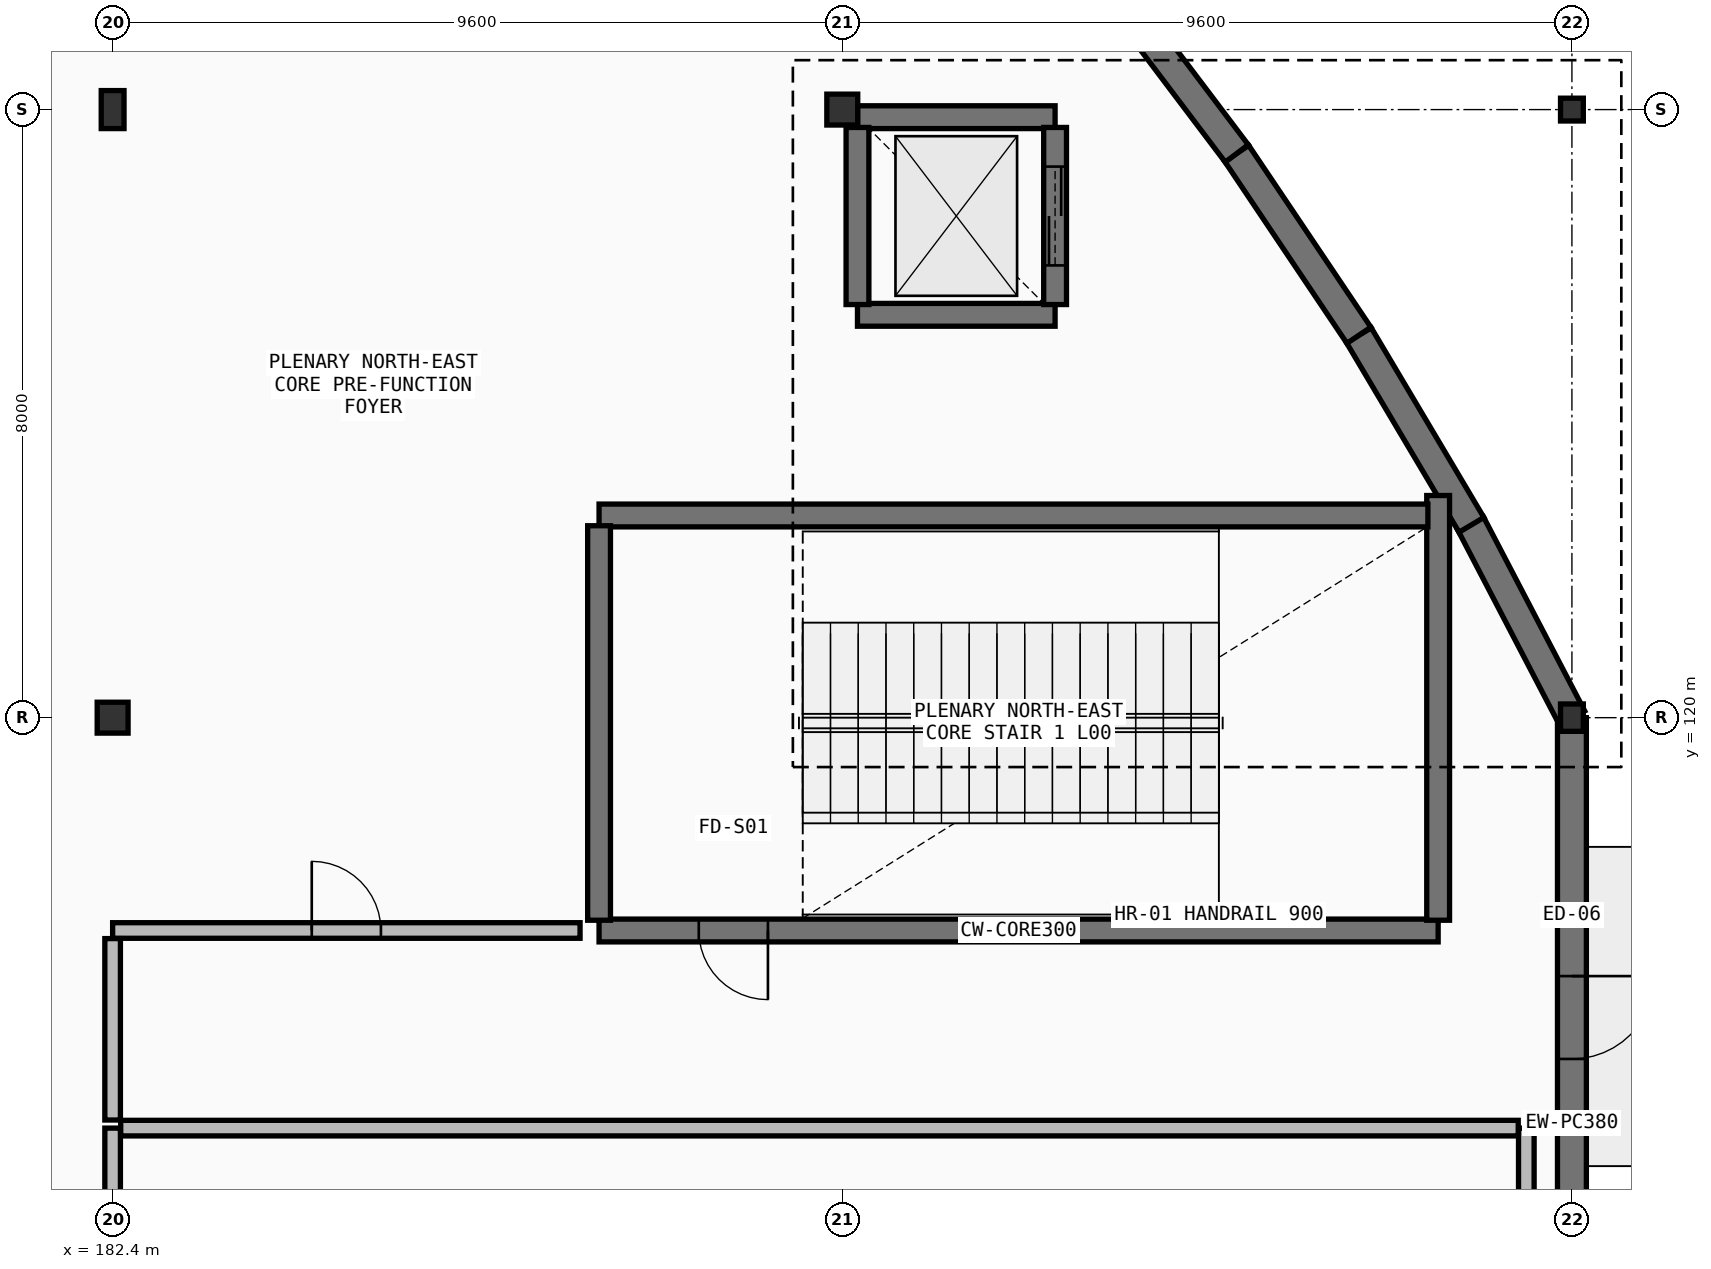
"""IFC4 building model, lengths in metres.
Left out: names, types, materials, properties, quantities, classifications, styles, units other than length and angle.
Written with IfcOpenShell. Run it as: python <this file> out.ifc"""

import sys

from ifc_helpers import new_model, si_unit, direction, frame, frame_2d, origin, origin_2d, place, context, subcontext, project, spatial, rectangle, hollow_circle, i_section, extrude, element, fill, save


model = new_model("IFC4")
c1 = context("Model", 3, precision=1e-05, world=origin(), true_north=direction((0.0, 1.0)))
c2 = subcontext(c1, "Body", "Model", "MODEL_VIEW")
j1 = project(units=[si_unit("LENGTHUNIT", "METRE"), si_unit("PLANEANGLEUNIT", "RADIAN")], contexts=[c1])
p1 = place(None, origin())
s1 = spatial("IfcSite", under=j1, at=p1, CompositionType="ELEMENT")
p2 = place(p1, origin())
s2 = spatial("IfcBuilding", under=s1, at=p2, CompositionType="ELEMENT")
p3 = place(p2, origin())
s3 = spatial("IfcBuildingStorey", under=s2, at=p3, CompositionType="ELEMENT", Elevation=0.0)
p4 = place(p3, frame((182.4, 120.0, 0.0), z_axis=(0.0, 0.0, 1.0), x_axis=(1.0, 0.0, 0.0)))
e1 = element("IfcColumn", 1, at=p4, inside=s3, PredefinedType="COLUMN", context=c2, shape_type="SweptSolid", body=[
    extrude(hollow_circle(Radius=0.203, WallThickness=0.02, at=origin_2d()), origin(), (0.0, 0.0, 1.0), 6.0),
])
p5 = place(p3, frame((182.4, 128.0, 0.0), z_axis=(0.0, 0.0, 1.0), x_axis=(1.0, 0.0, 0.0)))
e2 = element("IfcColumn", 2, at=p5, inside=s3, PredefinedType="COLUMN", context=c2, shape_type="SweptSolid", body=[
    extrude(i_section(OverallWidth=0.3, OverallDepth=0.5, WebThickness=0.014, FlangeThickness=0.028, FilletRadius=0.027, at=origin_2d()), origin(), (0.0, 0.0, 1.0), 6.0),
])
p6 = place(p3, frame((192.0, 128.0, 0.0), z_axis=(0.0, 0.0, 1.0), x_axis=(1.0, 0.0, 0.0)))
e3 = element("IfcColumn", 3, at=p6, inside=s3, PredefinedType="COLUMN", context=c2, shape_type="SweptSolid", body=[
    extrude(hollow_circle(Radius=0.203, WallThickness=0.02, at=origin_2d()), origin(), (0.0, 0.0, 1.0), 6.0),
])
p7 = place(p3, frame((201.6, 120.0, 0.0), z_axis=(0.0, 0.0, 1.0), x_axis=(1.0, 0.0, 0.0)))
e4 = element("IfcColumn", 4, at=p7, inside=s3, PredefinedType="COLUMN", context=c2, shape_type="SweptSolid", body=[
    extrude(i_section(OverallWidth=0.3, OverallDepth=0.36, WebThickness=0.012, FlangeThickness=0.022, FilletRadius=0.027, at=origin_2d()), origin(), (0.0, 0.0, 1.0), 6.0),
])
p8 = place(p3, frame((201.6, 128.0, 0.0), z_axis=(0.0, 0.0, 1.0), x_axis=(1.0, 0.0, 0.0)))
e5 = element("IfcColumn", 5, at=p8, inside=s3, PredefinedType="COLUMN", context=c2, shape_type="SweptSolid", body=[
    extrude(i_section(OverallWidth=0.3, OverallDepth=0.3, WebThickness=0.011, FlangeThickness=0.019, FilletRadius=0.027, at=origin_2d()), origin(), (0.0, 0.0, 1.0), 6.0),
])
p9 = place(p3, frame((201.6, 120.0, 0.0), z_axis=(0.0, 0.0, 1.0), x_axis=(0.0, -1.0, 0.0)))
e6 = element("IfcWall", 6, at=p9, inside=s3, PredefinedType="SOLIDWALL", context=c2, shape_type="SweptSolid", body=[
    extrude(rectangle(XDim=10.667, YDim=0.38, at=frame_2d((5.333, 0.0))), origin(), (0.0, 0.0, 1.0), 5.5),
])
p10 = place(p9, frame((3.4, 0.0, 0.0)))
e7 = element("IfcOpeningElement", 7, at=p10, cuts=e6, PredefinedType="OPENING", context=c2, shape_type="SweptSolid", body=[
    extrude(rectangle(XDim=1.09, YDim=2.22, at=frame_2d((0.545, 1.11))), frame((0.0, 0.2, 0.0), z_axis=(0.0, -1.0, 0.0), x_axis=(1.0, 0.0, 0.0)), (0.0, 0.0, 1.0), 0.4),
])
p11 = place(p3, frame((201.6, 120.0, 0.0), z_axis=(0.0, 0.0, 1.0), x_axis=(-0.462438550367, 0.886651333465, 0.0)))
e8 = element("IfcWall", 8, at=p11, inside=s3, PredefinedType="SOLIDWALL", context=c2, shape_type="SweptSolid", body=[
    extrude(rectangle(XDim=2.88, YDim=0.38, at=frame_2d((1.44, 0.0))), origin(), (0.0, 0.0, 1.0), 5.5),
])
p12 = place(p3, frame((200.278, 122.537, 0.0), z_axis=(0.0, 0.0, 1.0), x_axis=(-0.510616534419, 0.859808557051, 0.0)))
e9 = element("IfcWall", 9, at=p12, inside=s3, PredefinedType="SOLIDWALL", context=c2, shape_type="SweptSolid", body=[
    extrude(rectangle(XDim=2.901, YDim=0.38, at=frame_2d((1.45, 0.0))), origin(), (0.0, 0.0, 1.0), 5.5),
])
p13 = place(p3, frame((198.797, 125.031, 0.0), z_axis=(0.0, 0.0, 1.0), x_axis=(-0.55768775085, 0.830050825282, 0.0)))
e10 = element("IfcWall", 10, at=p13, inside=s3, PredefinedType="SOLIDWALL", context=c2, shape_type="SweptSolid", body=[
    extrude(rectangle(XDim=2.882, YDim=0.38, at=frame_2d((1.441, 0.0))), origin(), (0.0, 0.0, 1.0), 5.5),
])
p14 = place(p3, frame((197.19, 127.423, 0.0), z_axis=(0.0, 0.0, 1.0), x_axis=(-0.602763527755, 0.797919876685, 0.0)))
e11 = element("IfcWall", 11, at=p14, inside=s3, PredefinedType="SOLIDWALL", context=c2, shape_type="SweptSolid", body=[
    extrude(rectangle(XDim=2.88, YDim=0.38, at=frame_2d((1.44, 0.0))), origin(), (0.0, 0.0, 1.0), 5.5),
])
p15 = place(p3, frame((199.84, 117.2, 0.0), z_axis=(0.0, 0.0, 1.0), x_axis=(-1.0, 0.0, 0.0)))
e12 = element("IfcWall", 12, at=p15, inside=s3, PredefinedType="SHEAR", context=c2, shape_type="SweptSolid", body=[
    extrude(rectangle(XDim=11.04, YDim=0.3, at=frame_2d((5.52, 0.0))), origin(), (0.0, 0.0, 1.0), 5.64),
])
p16 = place(p15, frame((8.818, 0.0, 0.0)))
e13 = element("IfcOpeningElement", 13, at=p16, cuts=e12, PredefinedType="OPENING", context=c2, shape_type="SweptSolid", body=[
    extrude(rectangle(XDim=0.91, YDim=2.08, at=frame_2d((0.455, 1.04))), frame((0.0, 0.16, 0.0), z_axis=(0.0, -1.0, 0.0), x_axis=(1.0, 0.0, 0.0)), (0.0, 0.0, 1.0), 0.32),
])
p17 = place(p3, frame((199.84, 122.923, 0.0), z_axis=(0.0, 0.0, 1.0), x_axis=(0.0, -1.0, 0.0)))
e14 = element("IfcWall", 14, at=p17, inside=s3, PredefinedType="SHEAR", context=c2, shape_type="SweptSolid", body=[
    extrude(rectangle(XDim=5.588, YDim=0.3, at=frame_2d((2.794, 0.0))), origin(), (0.0, 0.0, 1.0), 5.64),
])
p18 = place(p3, frame((188.8, 122.66, 0.0), z_axis=(0.0, 0.0, 1.0), x_axis=(1.0, 0.0, 0.0)))
e15 = element("IfcWall", 15, at=p18, inside=s3, PredefinedType="SHEAR", context=c2, shape_type="SweptSolid", body=[
    extrude(rectangle(XDim=10.905, YDim=0.3, at=frame_2d((5.453, 0.0))), origin(), (0.0, 0.0, 1.0), 5.64),
])
p19 = place(p3, frame((188.8, 117.335, 0.0), z_axis=(0.0, 0.0, 1.0), x_axis=(0.0, 1.0, 0.0)))
e16 = element("IfcWall", 16, at=p19, inside=s3, PredefinedType="SHEAR", context=c2, shape_type="SweptSolid", body=[
    extrude(rectangle(XDim=5.19, YDim=0.3, at=frame_2d((2.595, 0.0))), origin(), (0.0, 0.0, 1.0), 5.64),
])
for number, where, z_axis, x_axis in (
    (17, (194.8, 127.9, 0.0), (0.0, 0.0, 1.0), (-1.0, 0.0, 0.0)),
    (18, (192.2, 125.3, 0.0), (0.0, 0.0, 1.0), (1.0, 0.0, 0.0)),
):
    element("IfcWall", number, at=place(p3, frame(where, z_axis=z_axis, x_axis=x_axis)), inside=s3, PredefinedType="SHEAR", context=c2, shape_type="SweptSolid", body=[
        extrude(rectangle(XDim=2.6, YDim=0.3, at=frame_2d((1.3, 0.0))), origin(), (0.0, 0.0, 1.0), 5.64),
    ])
p20 = place(p3, frame((194.8, 125.435, 0.0), z_axis=(0.0, 0.0, 1.0), x_axis=(0.0, 1.0, 0.0)))
e19 = element("IfcWall", 19, at=p20, inside=s3, PredefinedType="SHEAR", context=c2, shape_type="SweptSolid", body=[
    extrude(rectangle(XDim=2.33, YDim=0.3, at=frame_2d((1.165, 0.0))), origin(), (0.0, 0.0, 1.0), 5.64),
])
p21 = place(p20, frame((0.515, 0.0, 0.0)))
e20 = element("IfcOpeningElement", 20, at=p21, cuts=e19, PredefinedType="OPENING", context=c2, shape_type="SweptSolid", body=[
    extrude(rectangle(XDim=1.3, YDim=2.22, at=frame_2d((0.65, 1.11))), frame((0.0, 0.16, 0.0), z_axis=(0.0, -1.0, 0.0), x_axis=(1.0, 0.0, 0.0)), (0.0, 0.0, 1.0), 0.32),
])
p22 = place(p3, frame((192.2, 127.765, 0.0), z_axis=(0.0, 0.0, 1.0), x_axis=(0.0, -1.0, 0.0)))
e21 = element("IfcWall", 21, at=p22, inside=s3, PredefinedType="SHEAR", context=c2, shape_type="SweptSolid", body=[
    extrude(rectangle(XDim=2.33, YDim=0.3, at=frame_2d((1.165, 0.0))), origin(), (0.0, 0.0, 1.0), 5.64),
])
p23 = place(p3, frame((182.4, 114.6, 0.0), z_axis=(0.0, 0.0, 1.0), x_axis=(0.0, -1.0, 0.0)))
e22 = element("IfcWall", 22, at=p23, inside=s3, PredefinedType="SOLIDWALL", context=c2, shape_type="SweptSolid", body=[
    extrude(rectangle(XDim=18.2, YDim=0.205, at=frame_2d((9.1, 0.0))), origin(), (0.0, 0.0, 1.0), 5.01),
])
p24 = place(p23, frame((6.688, 0.0, 0.0)))
e23 = element("IfcOpeningElement", 23, at=p24, cuts=e22, PredefinedType="OPENING", context=c2, shape_type="SweptSolid", body=[
    extrude(rectangle(XDim=1.48, YDim=2.16, at=frame_2d((0.74, 1.08))), frame((0.0, 0.113, 0.0), z_axis=(0.0, -1.0, 0.0), x_axis=(1.0, 0.0, 0.0)), (0.0, 0.0, 1.0), 0.225),
])
p25 = place(p23, frame((13.424, 0.0, 0.0)))
e24 = element("IfcOpeningElement", 24, at=p25, cuts=e22, PredefinedType="OPENING", context=c2, shape_type="SweptSolid", body=[
    extrude(rectangle(XDim=0.99, YDim=2.28, at=frame_2d((0.495, 1.14))), frame((0.0, 0.113, 0.0), z_axis=(0.0, -1.0, 0.0), x_axis=(1.0, 0.0, 0.0)), (0.0, 0.0, 1.0), 0.225),
])
p26 = place(p3, frame((201.0, 96.507, 0.0), z_axis=(0.0, 0.0, 1.0), x_axis=(0.0, 1.0, 0.0)))
e25 = element("IfcWall", 25, at=p26, inside=s3, PredefinedType="SOLIDWALL", context=c2, shape_type="SweptSolid", body=[
    extrude(rectangle(XDim=18.094, YDim=0.205, at=frame_2d((9.047, 0.0))), origin(), (0.0, 0.0, 1.0), 4.81),
])
p27 = place(p3, frame((200.894, 114.6, 0.0), z_axis=(0.0, 0.0, 1.0), x_axis=(-1.0, 0.0, 0.0)))
e26 = element("IfcWall", 26, at=p27, inside=s3, PredefinedType="SOLIDWALL", context=c2, shape_type="SweptSolid", body=[
    extrude(rectangle(XDim=18.387, YDim=0.205, at=frame_2d((9.193, 0.0))), origin(), (0.0, 0.0, 1.0), 5.64),
])
p28 = place(p3, frame((182.4, 117.2, 0.0), z_axis=(0.0, 0.0, 1.0), x_axis=(1.0, 0.0, 0.0)))
e27 = element("IfcWall", 27, at=p28, inside=s3, PredefinedType="SOLIDWALL", context=c2, shape_type="SweptSolid", body=[
    extrude(rectangle(XDim=6.15, YDim=0.205, at=frame_2d((3.075, 0.0))), origin(), (0.0, 0.0, 1.0), 5.64),
])
p29 = place(p28, frame((2.62, 0.0, 0.0)))
e28 = element("IfcOpeningElement", 28, at=p29, cuts=e27, PredefinedType="OPENING", context=c2, shape_type="SweptSolid", body=[
    extrude(rectangle(XDim=0.91, YDim=2.08, at=frame_2d((0.455, 1.04))), frame((0.0, 0.113, 0.0), z_axis=(0.0, -1.0, 0.0), x_axis=(1.0, 0.0, 0.0)), (0.0, 0.0, 1.0), 0.225),
])
p30 = place(p3, frame((182.4, 114.707, 0.0), z_axis=(0.0, 0.0, 1.0), x_axis=(0.0, 1.0, 0.0)))
e29 = element("IfcWall", 29, at=p30, inside=s3, PredefinedType="SOLIDWALL", context=c2, shape_type="SweptSolid", body=[
    extrude(rectangle(XDim=2.387, YDim=0.205, at=frame_2d((1.193, 0.0))), origin(), (0.0, 0.0, 1.0), 5.06),
])
p31 = place(p16, origin())
e30 = element("IfcDoor", 30, at=p31, inside=s3, OperationType="SINGLE_SWING_LEFT", PredefinedType="DOOR", context=c2, shape_type="SweptSolid", body=[
    extrude(rectangle(XDim=0.91, YDim=2.08, at=frame_2d((0.455, 1.04))), frame((0.0, 0.025, 0.0), z_axis=(0.0, -1.0, 0.0), x_axis=(1.0, 0.0, 0.0)), (0.0, 0.0, 1.0), 0.05),
])
fill(e13, e30)
p32 = place(p21, origin())
e31 = element("IfcDoor", 31, at=p32, inside=s3, OperationType="DOUBLE_DOOR_SLIDING", PredefinedType="DOOR", context=c2, shape_type="SweptSolid", body=[
    extrude(rectangle(XDim=1.3, YDim=2.22, at=frame_2d((0.65, 1.11))), frame((0.0, 0.025, 0.0), z_axis=(0.0, -1.0, 0.0), x_axis=(1.0, 0.0, 0.0)), (0.0, 0.0, 1.0), 0.05),
])
fill(e20, e31)
p33 = place(p10, origin())
e32 = element("IfcDoor", 32, at=p33, inside=s3, OperationType="SINGLE_SWING_LEFT", PredefinedType="DOOR", context=c2, shape_type="SweptSolid", body=[
    extrude(rectangle(XDim=1.09, YDim=2.22, at=frame_2d((0.545, 1.11))), frame((0.0, 0.025, 0.0), z_axis=(0.0, -1.0, 0.0), x_axis=(1.0, 0.0, 0.0)), (0.0, 0.0, 1.0), 0.05),
])
fill(e7, e32)
p34 = place(p29, origin())
e33 = element("IfcDoor", 33, at=p34, inside=s3, OperationType="SINGLE_SWING_RIGHT", PredefinedType="DOOR", context=c2, shape_type="SweptSolid", body=[
    extrude(rectangle(XDim=0.91, YDim=2.08, at=frame_2d((0.455, 1.04))), frame((0.0, 0.025, 0.0), z_axis=(0.0, -1.0, 0.0), x_axis=(1.0, 0.0, 0.0)), (0.0, 0.0, 1.0), 0.05),
])
fill(e28, e33)
save(model, sys.argv[1])
